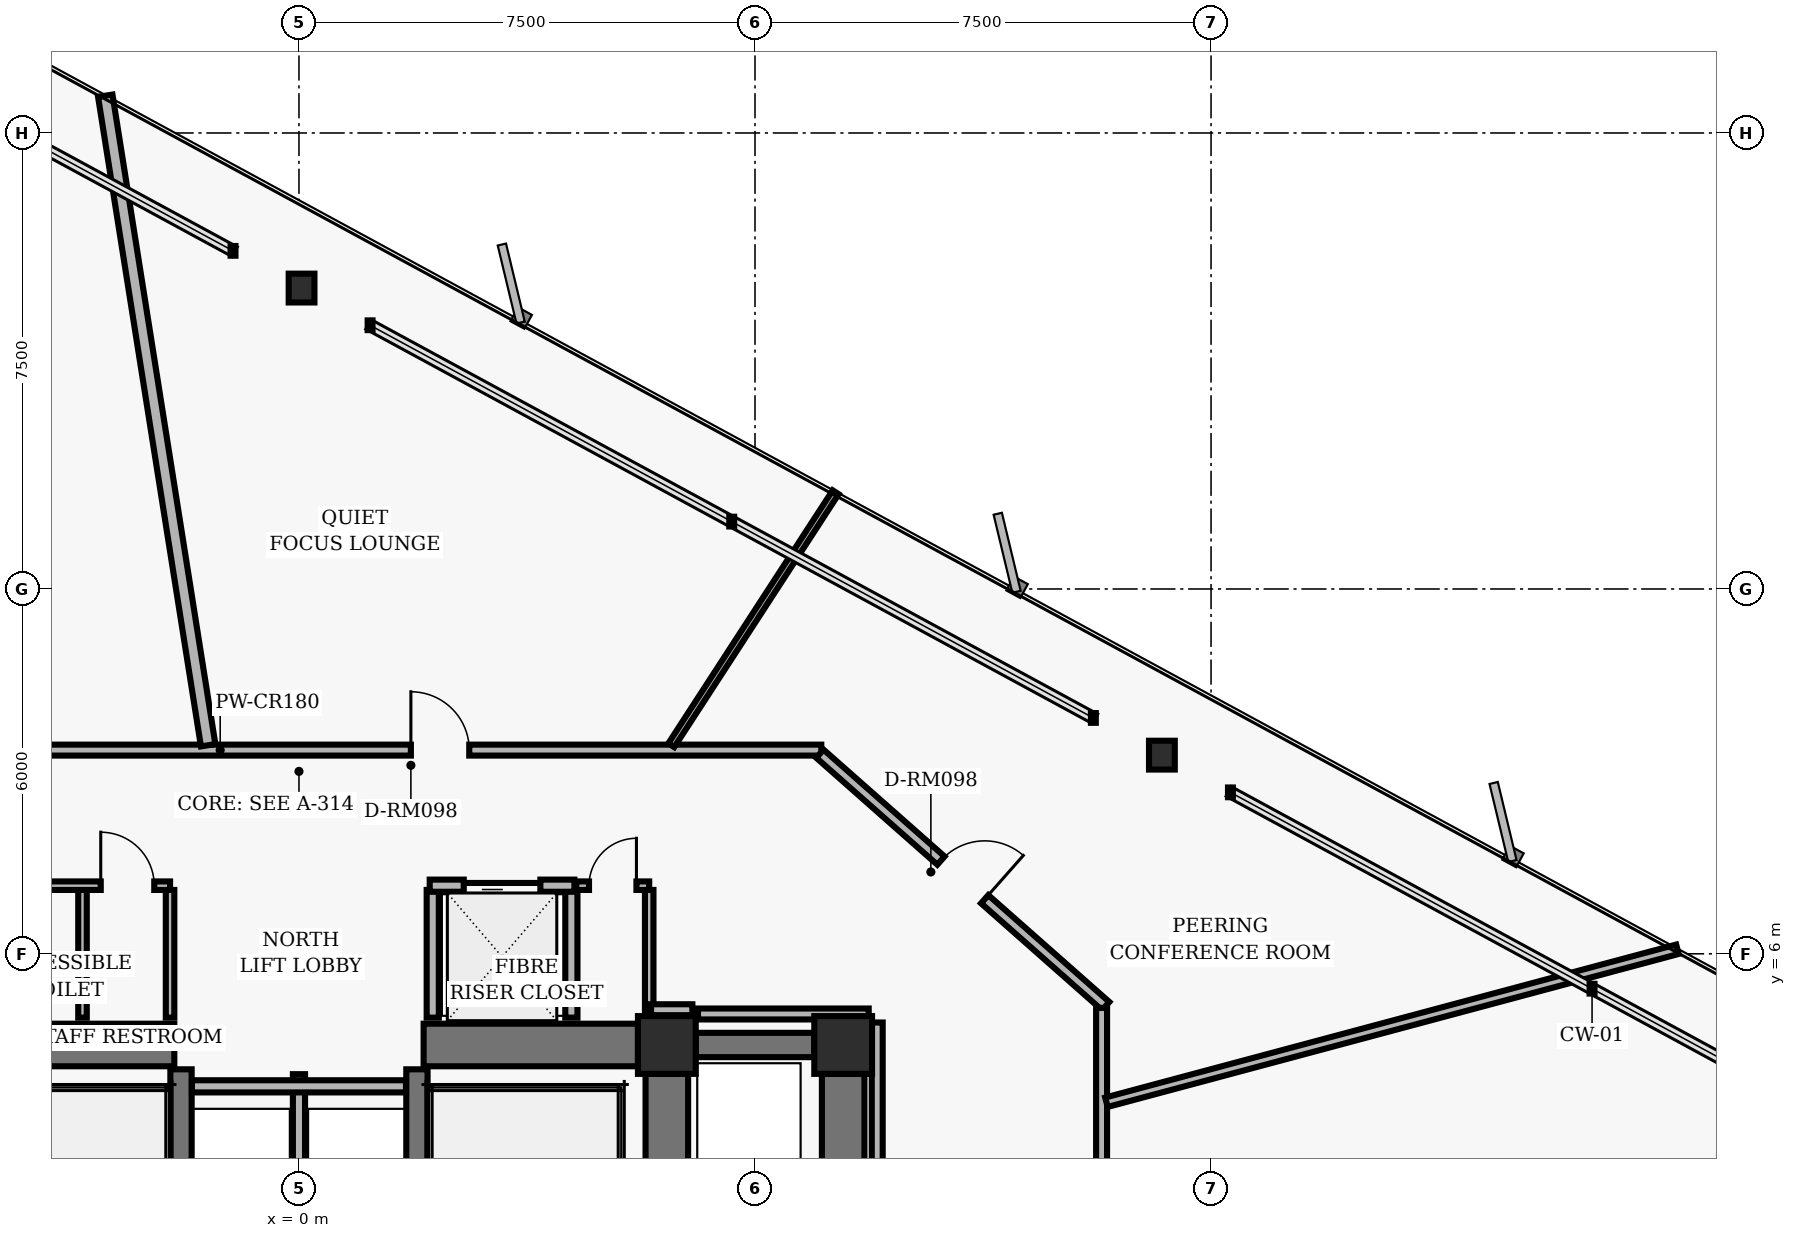
"""IFC4 building model, lengths in metres.
Left out: names, types, materials, properties, quantities, classifications, styles, units other than length and angle.
Written with IfcOpenShell. Run it as: python <this file> out.ifc"""

import sys

from ifc_helpers import new_model, si_unit, direction, frame, frame_2d, origin, origin_2d, place, context, subcontext, project, spatial, rectangle, hollow_rectangle, i_section, extrude, element, fill, save


model = new_model("IFC4")
c1 = context("Model", 3, precision=1e-05, world=origin(), true_north=direction((0.0, 1.0)))
c2 = subcontext(c1, "Body", "Model", "MODEL_VIEW")
j1 = project(units=[si_unit("LENGTHUNIT", "METRE"), si_unit("PLANEANGLEUNIT", "RADIAN")], contexts=[c1])
p1 = place(None, origin())
s1 = spatial("IfcSite", under=j1, at=p1, CompositionType="ELEMENT")
p2 = place(p1, origin())
s2 = spatial("IfcBuilding", under=s1, at=p2, CompositionType="ELEMENT")
p3 = place(p2, frame((0.0, 0.0, 35.68)))
s3 = spatial("IfcBuildingStorey", under=s2, at=p3, CompositionType="ELEMENT", Elevation=35.68)
for number, where, z_axis, x_axis in (
    (1, (6.05, 4.5, 0.0), (0.0, 0.0, 1.0), (1.0, 0.0, 0.0)),
    (2, (8.95, 4.5, 0.0), (0.0, 0.0, 1.0), (1.0, 0.0, 0.0)),
):
    element("IfcColumn", number, at=place(p3, frame(where, z_axis=z_axis, x_axis=x_axis)), inside=s3, PredefinedType="COLUMN", context=c2, shape_type="SweptSolid", body=[
        extrude(hollow_rectangle(XDim=0.95, YDim=0.95, WallThickness=0.06, InnerFilletRadius=0.02, OuterFilletRadius=0.04, at=origin_2d()), origin(), (0.0, 0.0, 1.0), 3.36),
    ])
p4 = place(p3, frame((6.05, 0.475, 0.0), z_axis=(0.0, 0.0, 1.0), x_axis=(0.0, 1.0, 0.0)))
e3 = element("IfcWall", 3, at=p4, inside=s3, PredefinedType="SHEAR", context=c2, shape_type="SweptSolid", body=[
    extrude(rectangle(XDim=3.55, YDim=0.7, at=frame_2d((1.775, 0.0))), origin(), (0.0, 0.0, 1.0), 3.098),
])
for number, where, z_axis, x_axis in (
    (4, (-1.94, -4.1, 0.0), (0.0, 0.0, 1.0), (0.0, 1.0, 0.0)),
    (5, (1.94, -4.1, 0.0), (0.0, 0.0, 1.0), (0.0, 1.0, 0.0)),
):
    element("IfcWall", number, at=place(p3, frame(where, z_axis=z_axis, x_axis=x_axis)), inside=s3, PredefinedType="SHEAR", context=c2, shape_type="SweptSolid", body=[
        extrude(rectangle(XDim=8.2, YDim=0.35, at=frame_2d((4.1, 0.0))), origin(), (0.0, 0.0, 1.0), 3.098),
    ])
for number, where, z_axis, x_axis in (
    (6, (-5.575, 4.5, 0.0), (0.0, 0.0, 1.0), (1.0, 0.0, 0.0)),
    (7, (2.05, 4.5, 0.0), (0.0, 0.0, 1.0), (1.0, 0.0, 0.0)),
):
    element("IfcWall", number, at=place(p3, frame(where, z_axis=z_axis, x_axis=x_axis)), inside=s3, PredefinedType="SHEAR", context=c2, shape_type="SweptSolid", body=[
        extrude(rectangle(XDim=3.525, YDim=0.7, at=frame_2d((1.762, 0.0))), origin(), (0.0, 0.0, 1.0), 3.098),
    ])
p5 = place(p3, frame((8.95, -3.825, 0.0), z_axis=(0.0, 0.0, 1.0), x_axis=(0.0, 1.0, 0.0)))
e8 = element("IfcWall", 8, at=p5, inside=s3, PredefinedType="SHEAR", context=c2, shape_type="SweptSolid", body=[
    extrude(rectangle(XDim=7.85, YDim=0.7, at=frame_2d((3.925, 0.0))), origin(), (0.0, 0.0, 1.0), 3.098),
])
p6 = place(p3, frame((6.525, 4.5, 0.0), z_axis=(0.0, 0.0, 1.0), x_axis=(1.0, 0.0, 0.0)))
e9 = element("IfcWall", 9, at=p6, inside=s3, PredefinedType="SHEAR", context=c2, shape_type="SweptSolid", body=[
    extrude(rectangle(XDim=1.95, YDim=0.4, at=frame_2d((0.975, 0.0))), origin(), (0.0, 0.0, 1.0), 3.098),
])
for number, where, z_axis, x_axis in (
    (10, (14.192, 9.267, 0.0), (0.0, 0.0, 1.0), (1.0, 0.0, 0.0)),
    (11, (0.043, 16.949, 0.0), (0.0, 0.0, 1.0), (1.0, 0.0, 0.0)),
):
    element("IfcColumn", number, at=place(p3, frame(where, z_axis=z_axis, x_axis=x_axis)), inside=s3, PredefinedType="COLUMN", context=c2, shape_type="SweptSolid", body=[
        extrude(i_section(OverallWidth=0.424, OverallDepth=0.474, WebThickness=0.048, FlangeThickness=0.077, FilletRadius=0.025, at=origin_2d()), origin(), (0.0, 0.0, 1.0), 3.36),
    ])
p7 = place(p3, frame((0.0, 1.25, 0.0), z_axis=(0.0, 0.0, 1.0), x_axis=(0.0, 1.0, 0.0)))
e12 = element("IfcWall", 12, at=p7, inside=s3, PredefinedType="PARTITIONING", context=c2, shape_type="SweptSolid", body=[
    extrude(rectangle(XDim=2.77, YDim=0.2, at=frame_2d((1.385, 0.0))), origin(), (0.0, 0.0, 1.0), 3.073),
])
p8 = place(p3, frame((-1.76, 3.82, 0.0), z_axis=(0.0, 0.0, 1.0), x_axis=(1.0, 0.0, 0.0)))
e13 = element("IfcWall", 13, at=p8, inside=s3, PredefinedType="PARTITIONING", context=c2, shape_type="SweptSolid", body=[
    extrude(rectangle(XDim=3.52, YDim=0.2, at=frame_2d((1.76, 0.0))), origin(), (0.0, 0.0, 1.0), 3.073),
])
for number, where, z_axis, x_axis in (
    (14, (2.2, 4.95, 0.0), (0.0, 0.0, 1.0), (0.0, 1.0, 0.0)),
    (15, (4.48, 4.95, 0.0), (0.0, 0.0, 1.0), (0.0, 1.0, 0.0)),
):
    element("IfcWall", number, at=place(p3, frame(where, z_axis=z_axis, x_axis=x_axis)), inside=s3, PredefinedType="PARTITIONING", context=c2, shape_type="SweptSolid", body=[
        extrude(rectangle(XDim=2.1, YDim=0.2, at=frame_2d((1.05, 0.0))), origin(), (0.0, 0.0, 1.0), 3.073),
    ])
p9 = place(p3, frame((2.15, 7.12, 0.0), z_axis=(0.0, 0.0, 1.0), x_axis=(1.0, 0.0, 0.0)))
e16 = element("IfcWall", 16, at=p9, inside=s3, PredefinedType="PARTITIONING", context=c2, shape_type="SweptSolid", body=[
    extrude(rectangle(XDim=2.38, YDim=0.2, at=frame_2d((1.19, 0.0))), origin(), (0.0, 0.0, 1.0), 3.073),
])
p10 = place(p9, frame((0.56, 0.0, 0.0)))
e17 = element("IfcOpeningElement", 17, at=p10, cuts=e16, PredefinedType="OPENING", context=c2, shape_type="SweptSolid", body=[
    extrude(rectangle(XDim=1.26, YDim=2.06, at=frame_2d((0.63, 1.03))), frame((0.0, 0.11, 0.0), z_axis=(0.0, -1.0, 0.0), x_axis=(1.0, 0.0, 0.0)), (0.0, 0.0, 1.0), 0.22),
])
for number, where, z_axis, x_axis in (
    (18, (-3.56, 4.95, 0.0), (0.0, 0.0, 1.0), (0.0, 1.0, 0.0)),
    (19, (-2.12, 4.95, 0.0), (0.0, 0.0, 1.0), (0.0, 1.0, 0.0)),
):
    element("IfcWall", number, at=place(p3, frame(where, z_axis=z_axis, x_axis=x_axis)), inside=s3, PredefinedType="PARTITIONING", context=c2, shape_type="SweptSolid", body=[
        extrude(rectangle(XDim=2.1, YDim=0.14, at=frame_2d((1.05, 0.0))), origin(), (0.0, 0.0, 1.0), 3.073),
    ])
p11 = place(p3, frame((-5.48, 7.12, 0.0), z_axis=(0.0, 0.0, 1.0), x_axis=(1.0, 0.0, 0.0)))
e20 = element("IfcWall", 20, at=p11, inside=s3, PredefinedType="PARTITIONING", context=c2, shape_type="SweptSolid", body=[
    extrude(rectangle(XDim=3.36, YDim=0.14, at=frame_2d((1.68, 0.0))), origin(), (0.0, 0.0, 1.0), 3.073),
])
p12 = place(p11, frame((0.48, 0.0, 0.0)))
e21 = element("IfcOpeningElement", 21, at=p12, cuts=e20, PredefinedType="OPENING", context=c2, shape_type="SweptSolid", body=[
    extrude(rectangle(XDim=0.88, YDim=2.02, at=frame_2d((0.44, 1.01))), frame((0.0, 0.08, 0.0), z_axis=(0.0, -1.0, 0.0), x_axis=(1.0, 0.0, 0.0)), (0.0, 0.0, 1.0), 0.16),
])
p13 = place(p11, frame((2.22, 0.0, 0.0)))
e22 = element("IfcOpeningElement", 22, at=p13, cuts=e20, PredefinedType="OPENING", context=c2, shape_type="SweptSolid", body=[
    extrude(rectangle(XDim=0.88, YDim=2.02, at=frame_2d((0.44, 1.01))), frame((0.0, 0.08, 0.0), z_axis=(0.0, -1.0, 0.0), x_axis=(1.0, 0.0, 0.0)), (0.0, 0.0, 1.0), 0.16),
])
p14 = place(p3, frame((5.76, 4.95, 0.0), z_axis=(0.0, 0.0, 1.0), x_axis=(0.0, 1.0, 0.0)))
e23 = element("IfcWall", 23, at=p14, inside=s3, PredefinedType="PARTITIONING", context=c2, shape_type="SweptSolid", body=[
    extrude(rectangle(XDim=2.1, YDim=0.14, at=frame_2d((1.05, 0.0))), origin(), (0.0, 0.0, 1.0), 3.073),
])
p15 = place(p3, frame((4.56, 7.12, 0.0), z_axis=(0.0, 0.0, 1.0), x_axis=(1.0, 0.0, 0.0)))
e24 = element("IfcWall", 24, at=p15, inside=s3, PredefinedType="PARTITIONING", context=c2, shape_type="SweptSolid", body=[
    extrude(rectangle(XDim=1.2, YDim=0.14, at=frame_2d((0.6, 0.0))), origin(), (0.0, 0.0, 1.0), 3.073),
])
p16 = place(p15, frame((0.21, 0.0, 0.0)))
e25 = element("IfcOpeningElement", 25, at=p16, cuts=e24, PredefinedType="OPENING", context=c2, shape_type="SweptSolid", body=[
    extrude(rectangle(XDim=0.78, YDim=2.01, at=frame_2d((0.39, 1.005))), frame((0.0, 0.08, 0.0), z_axis=(0.0, -1.0, 0.0), x_axis=(1.0, 0.0, 0.0)), (0.0, 0.0, 1.0), 0.16),
])
p17 = place(p3, frame((-8.59, 9.35, 0.0), z_axis=(0.0, 0.0, 1.0), x_axis=(1.0, 0.0, 0.0)))
e26 = element("IfcWall", 26, at=p17, inside=s3, PredefinedType="PARTITIONING", context=c2, shape_type="SweptSolid", body=[
    extrude(rectangle(XDim=17.18, YDim=0.18, at=frame_2d((8.59, 0.0))), origin(), (0.0, 0.0, 1.0), 2.587),
])
p18 = place(p17, frame((10.43, 0.0, 0.0)))
e27 = element("IfcOpeningElement", 27, at=p18, cuts=e26, PredefinedType="OPENING", context=c2, shape_type="SweptSolid", body=[
    extrude(rectangle(XDim=0.96, YDim=2.02, at=frame_2d((0.48, 1.01))), frame((0.0, 0.1, 0.0), z_axis=(0.0, -1.0, 0.0), x_axis=(1.0, 0.0, 0.0)), (0.0, 0.0, 1.0), 0.2),
])
p19 = place(p17, frame((3.198, 0.0, 0.0)))
e28 = element("IfcOpeningElement", 28, at=p19, cuts=e26, PredefinedType="OPENING", context=c2, shape_type="SweptSolid", body=[
    extrude(rectangle(XDim=0.96, YDim=2.02, at=frame_2d((0.48, 1.01))), frame((0.0, 0.1, 0.0), z_axis=(0.0, -1.0, 0.0), x_axis=(1.0, 0.0, 0.0)), (0.0, 0.0, 1.0), 0.2),
])
p20 = place(p3, frame((8.567, 9.29, 0.0), z_axis=(0.0, 0.0, 1.0), x_axis=(0.749626463267, -0.66186113768, 0.0)))
e29 = element("IfcWall", 29, at=p20, inside=s3, PredefinedType="PARTITIONING", context=c2, shape_type="SweptSolid", body=[
    extrude(rectangle(XDim=6.27, YDim=0.18, at=frame_2d((3.135, 0.0))), origin(), (0.0, 0.0, 1.0), 2.587),
])
p21 = place(p20, frame((2.655, 0.0, 0.0)))
e30 = element("IfcOpeningElement", 30, at=p21, cuts=e29, PredefinedType="OPENING", context=c2, shape_type="SweptSolid", body=[
    extrude(rectangle(XDim=0.96, YDim=2.02, at=frame_2d((0.48, 1.01))), frame((0.0, 0.1, 0.0), z_axis=(0.0, -1.0, 0.0), x_axis=(1.0, 0.0, 0.0)), (0.0, 0.0, 1.0), 0.2),
])
p22 = place(p3, frame((13.2, 5.11, 0.0), z_axis=(0.0, 0.0, 1.0), x_axis=(0.0, -1.0, 0.0)))
e31 = element("IfcWall", 31, at=p22, inside=s3, PredefinedType="PARTITIONING", context=c2, shape_type="SweptSolid", body=[
    extrude(rectangle(XDim=10.22, YDim=0.18, at=frame_2d((5.11, 0.0))), origin(), (0.0, 0.0, 1.0), 3.073),
])
p23 = place(p22, frame((5.277, 0.0, 0.0)))
e32 = element("IfcOpeningElement", 32, at=p23, cuts=e31, PredefinedType="OPENING", context=c2, shape_type="SweptSolid", body=[
    extrude(rectangle(XDim=0.96, YDim=2.02, at=frame_2d((0.48, 1.01))), frame((0.0, 0.1, 0.0), z_axis=(0.0, -1.0, 0.0), x_axis=(1.0, 0.0, 0.0)), (0.0, 0.0, 1.0), 0.2),
])
p24 = place(p3, frame((9.51, -4.87, 0.0), z_axis=(0.0, 0.0, 1.0), x_axis=(0.0, 1.0, 0.0)))
e33 = element("IfcWall", 33, at=p24, inside=s3, PredefinedType="PARTITIONING", context=c2, shape_type="SweptSolid", body=[
    extrude(rectangle(XDim=9.74, YDim=0.18, at=frame_2d((4.87, 0.0))), origin(), (0.0, 0.0, 1.0), 3.073),
])
p25 = place(p3, frame((9.37, 5.01, 0.0), z_axis=(0.0, 0.0, 1.0), x_axis=(-1.0, 0.0, 0.0)))
e34 = element("IfcWall", 34, at=p25, inside=s3, PredefinedType="PARTITIONING", context=c2, shape_type="SweptSolid", body=[
    extrude(rectangle(XDim=2.808, YDim=0.18, at=frame_2d((1.404, 0.0))), origin(), (0.0, 0.0, 1.0), 3.073),
])
p26 = place(p3, frame((6.47, 5.08, 0.0), z_axis=(0.0, 0.0, 1.0), x_axis=(-1.0, 0.0, 0.0)))
e35 = element("IfcWall", 35, at=p26, inside=s3, PredefinedType="PARTITIONING", context=c2, shape_type="SweptSolid", body=[
    extrude(rectangle(XDim=0.68, YDim=0.18, at=frame_2d((0.34, 0.0))), origin(), (0.0, 0.0, 1.0), 3.073),
])
p27 = place(p3, frame((13.28, 3.558, 0.0), z_axis=(0.0, 0.0, 1.0), x_axis=(0.965926641133, 0.258816004043, 0.0)))
e36 = element("IfcWall", 36, at=p27, inside=s3, PredefinedType="PARTITIONING", context=c2, shape_type="SweptSolid", body=[
    extrude(rectangle(XDim=9.722, YDim=0.16, at=frame_2d((4.861, 0.0))), origin(), (0.0, 0.0, 1.0), 3.073),
])
p28 = place(p3, frame((6.124, 9.43, 0.0), z_axis=(0.0, 0.0, 1.0), x_axis=(0.544668366902, 0.838651518866, 0.0)))
e37 = element("IfcWall", 37, at=p28, inside=s3, PredefinedType="MOVABLE", context=c2, shape_type="SweptSolid", body=[
    extrude(rectangle(XDim=4.962, YDim=0.115, at=frame_2d((2.481, 0.0))), origin(), (0.0, 0.0, 1.0), 3.073),
])
p29 = place(p3, frame((-1.494, 9.43, 0.0), z_axis=(0.0, 0.0, 1.0), x_axis=(-0.156418067091, 0.987690937636, 0.0)))
e38 = element("IfcWall", 38, at=p29, inside=s3, PredefinedType="PARTITIONING", context=c2, shape_type="SweptSolid", body=[
    extrude(rectangle(XDim=10.816, YDim=0.24, at=frame_2d((5.408, 0.0))), origin(), (0.0, 0.0, 1.0), 3.073),
])
p30 = place(p10, origin())
e39 = element("IfcDoor", 39, at=p30, inside=s3, OperationType="SLIDING_TO_LEFT", PredefinedType="DOOR", context=c2, shape_type="SweptSolid", body=[
    extrude(rectangle(XDim=1.26, YDim=2.06, at=frame_2d((0.63, 1.03))), frame((0.0, 0.025, 0.0), z_axis=(0.0, -1.0, 0.0), x_axis=(1.0, 0.0, 0.0)), (0.0, 0.0, 1.0), 0.05),
])
fill(e17, e39)
p31 = place(p13, origin())
e40 = element("IfcDoor", 40, at=p31, inside=s3, OperationType="SINGLE_SWING_LEFT", PredefinedType="DOOR", context=c2, shape_type="SweptSolid", body=[
    extrude(rectangle(XDim=0.88, YDim=2.02, at=frame_2d((0.44, 1.01))), frame((0.0, 0.025, 0.0), z_axis=(0.0, -1.0, 0.0), x_axis=(1.0, 0.0, 0.0)), (0.0, 0.0, 1.0), 0.05),
])
fill(e22, e40)
p32 = place(p16, origin())
e41 = element("IfcDoor", 41, at=p32, inside=s3, OperationType="SINGLE_SWING_RIGHT", PredefinedType="DOOR", context=c2, shape_type="SweptSolid", body=[
    extrude(rectangle(XDim=0.78, YDim=2.01, at=frame_2d((0.39, 1.005))), frame((0.0, 0.025, 0.0), z_axis=(0.0, -1.0, 0.0), x_axis=(1.0, 0.0, 0.0)), (0.0, 0.0, 1.0), 0.05),
])
fill(e25, e41)
p33 = place(p21, origin())
e42 = element("IfcDoor", 42, at=p33, inside=s3, OperationType="SINGLE_SWING_RIGHT", PredefinedType="DOOR", context=c2, shape_type="SweptSolid", body=[
    extrude(rectangle(XDim=0.96, YDim=2.02, at=frame_2d((0.48, 1.01))), frame((0.0, 0.025, 0.0), z_axis=(0.0, -1.0, 0.0), x_axis=(1.0, 0.0, 0.0)), (0.0, 0.0, 1.0), 0.05),
])
fill(e30, e42)
p34 = place(p18, origin())
e43 = element("IfcDoor", 43, at=p34, inside=s3, OperationType="SINGLE_SWING_LEFT", PredefinedType="DOOR", context=c2, shape_type="SweptSolid", body=[
    extrude(rectangle(XDim=0.96, YDim=2.02, at=frame_2d((0.48, 1.01))), frame((0.0, 0.025, 0.0), z_axis=(0.0, -1.0, 0.0), x_axis=(1.0, 0.0, 0.0)), (0.0, 0.0, 1.0), 0.05),
])
fill(e27, e43)
save(model, sys.argv[1])
